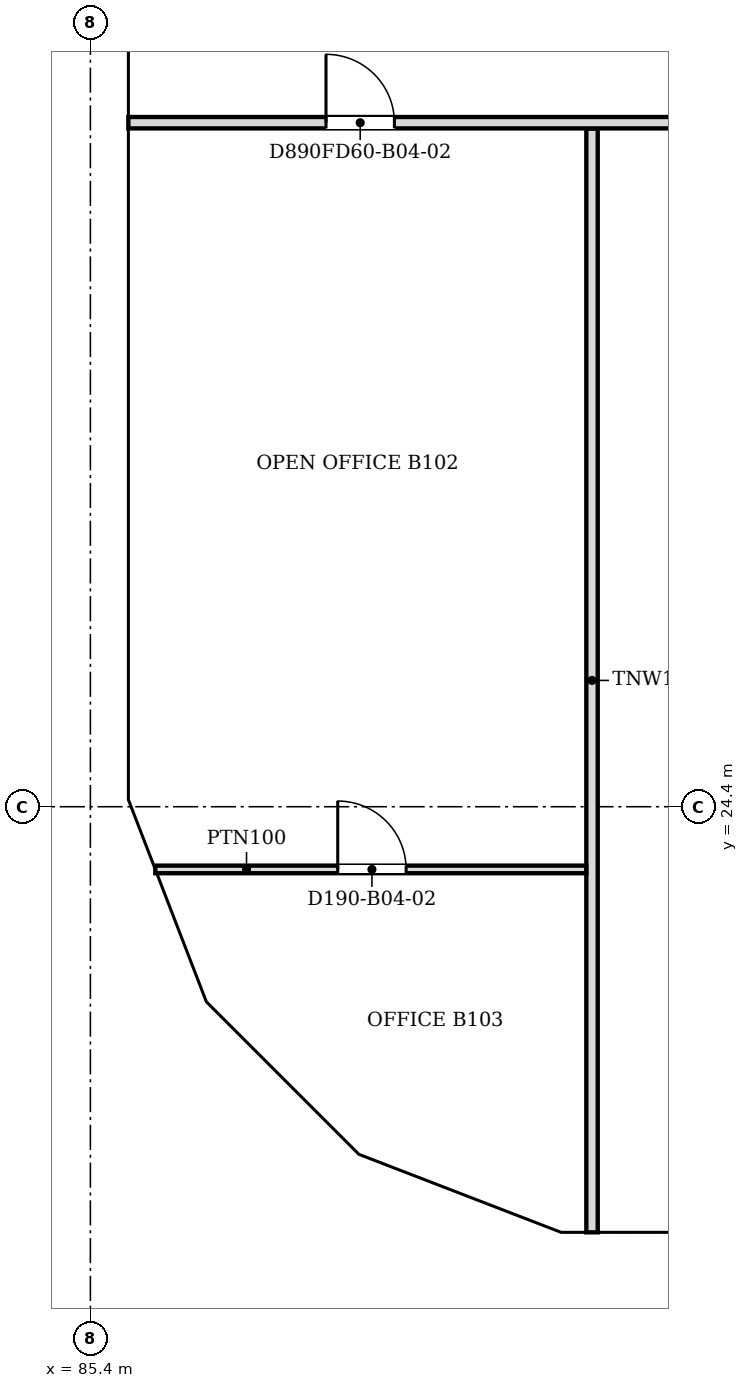
"""IFC4 building model, lengths in metres.
Left out: names, types, materials, properties, quantities, classifications, styles, units other than length and angle.
Written with IfcOpenShell. Run it as: python <this file> out.ifc"""

import sys

from ifc_helpers import new_model, si_unit, direction, frame, frame_2d, origin, place, context, subcontext, project, spatial, polyline, rectangle, outline, extrude, faceted_brep, source, transform, mapped, element, fill, save


model = new_model("IFC4")
c1 = context("Model", 3, precision=1e-05, world=origin(), true_north=direction((0.0, 1.0)))
c2 = subcontext(c1, "Body", "Model", "MODEL_VIEW")
j1 = project(units=[si_unit("LENGTHUNIT", "METRE"), si_unit("PLANEANGLEUNIT", "RADIAN")], contexts=[c1])
p1 = place(None, origin())
s1 = spatial("IfcSite", under=j1, at=p1, CompositionType="ELEMENT")
p2 = place(p1, origin())
s2 = spatial("IfcBuilding", under=s1, at=p2, CompositionType="ELEMENT")
p3 = place(p2, frame((0.0, 0.0, 37.2)))
s3 = spatial("IfcBuildingStorey", under=s2, at=p3, CompositionType="ELEMENT", Elevation=37.2)
m1 = source(origin(), c2, "Body", "Brep", [
    faceted_brep([(3.003, -0.25, 0.0), (6.053, -0.25, 3.8), (3.003, -0.25, 7.6), (0.0, -0.25, 3.8), (0.047, 0.25, 3.859), (3.003, 0.25, 7.6), (6.053, 0.25, 3.8), (3.003, 0.25, 0.0), (0.047, 0.25, 3.741), (0.0, 0.0, 3.8)], [[[0, 1, 2, 3]], [[4, 5, 6, 7, 8]], [[7, 6, 1, 0]], [[6, 5, 2, 1]], [[5, 4, 9, 3, 2]], [[8, 7, 0, 3, 9]], [[8, 9, 4]]]),
])
p4 = place(p3, frame((91.547, 18.55, -3.8), z_axis=(0.0, 0.0, 1.0), x_axis=(1.0, 0.0, 0.0)))
e1 = element("IfcWall", 1, at=p4, inside=s3, PredefinedType="SOLIDWALL", context=c2, shape_type="MappedRepresentation", body=[
    mapped(m1, transform((0.0, 0.0, 0.0), scale=1.0)),
])
m2 = source(origin(), c2, "Body", "SweptSolid", [
    extrude(outline(polyline([(3.005, 0.401), (5.733, 3.8), (3.005, 7.199), (0.319, 3.8), (3.005, 0.401)])), frame((0.0, 0.26, 0.0), z_axis=(0.0, -1.0, 0.0), x_axis=(1.0, 0.0, 0.0)), (0.0, 0.0, 1.0), 0.52),
])
p5 = place(p4, origin())
e2 = element("IfcOpeningElement", 2, at=p5, cuts=e1, PredefinedType="OPENING", context=c2, shape_type="MappedRepresentation", body=[
    mapped(m2, transform((0.0, 0.0, 0.0), scale=1.0)),
])
m3 = source(origin(), c2, "Body", "Brep", [
    faceted_brep([(3.05, -0.25, 0.0), (6.1, -0.25, 3.8), (6.1, -0.25, 3.8), (3.05, -0.25, 7.6), (0.0, -0.25, 3.8), (0.0, 0.25, 3.8), (3.05, 0.25, 7.6), (6.1, 0.25, 3.8), (6.1, 0.25, 3.8), (3.05, 0.25, 0.0)], [[[0, 1, 2, 3, 4]], [[5, 6, 7, 8, 9]], [[9, 8, 1, 0]], [[7, 6, 3, 2]], [[6, 5, 4, 3]], [[5, 9, 0, 4]], [[1, 8, 7, 2]]]),
])
p6 = place(p3, frame((85.65, 39.65, -3.8), z_axis=(0.0, 0.0, 1.0), x_axis=(0.0, -1.0, 0.0)))
e3 = element("IfcWall", 3, at=p6, inside=s3, PredefinedType="SOLIDWALL", context=c2, shape_type="MappedRepresentation", body=[
    mapped(m3, transform((0.0, 0.0, 0.0), scale=1.0)),
])
m4 = source(origin(), c2, "Body", "SweptSolid", [
    extrude(outline(polyline([(3.05, 0.399), (5.78, 3.8), (3.05, 7.201), (0.321, 3.8), (3.05, 0.399)])), frame((0.0, 0.26, 0.0), z_axis=(0.0, -1.0, 0.0), x_axis=(1.0, 0.0, 0.0)), (0.0, 0.0, 1.0), 0.52),
])
p7 = place(p6, origin())
e4 = element("IfcOpeningElement", 4, at=p7, cuts=e3, PredefinedType="OPENING", context=c2, shape_type="MappedRepresentation", body=[
    mapped(m4, transform((0.0, 0.0, 0.0), scale=1.0)),
])
m5 = source(origin(), c2, "Body", "SweptSolid", [
    extrude(outline(polyline([(3.05, 0.0), (6.1, 3.8), (3.05, 7.6), (0.0, 3.8), (3.05, 0.0)])), frame((0.0, 0.25, 0.0), z_axis=(0.0, -1.0, 0.0), x_axis=(1.0, 0.0, 0.0)), (0.0, 0.0, 1.0), 0.5),
])
p8 = place(p3, frame((85.65, 33.55, -3.8), z_axis=(0.0, 0.0, 1.0), x_axis=(0.0, -1.0, 0.0)))
e5 = element("IfcWall", 5, at=p8, inside=s3, PredefinedType="SOLIDWALL", context=c2, shape_type="MappedRepresentation", body=[
    mapped(m5, transform((0.0, 0.0, 0.0), scale=1.0)),
])
p9 = place(p8, origin())
e6 = element("IfcOpeningElement", 6, at=p9, cuts=e5, PredefinedType="OPENING", context=c2, shape_type="MappedRepresentation", body=[
    mapped(m4, transform((0.0, 0.0, 0.0), scale=1.0)),
])
m6 = source(origin(), c2, "Body", "Brep", [
    faceted_brep([(3.003, -0.25, 0.0), (3.05, -0.25, 0.06), (3.05, -0.25, 7.54), (3.003, -0.25, 7.6), (0.0, -0.25, 3.8), (0.0, 0.25, 3.8), (2.957, 0.25, 7.541), (2.957, 0.25, 0.059), (3.003, 0.0, 0.0), (3.003, 0.0, 7.6)], [[[0, 1, 2, 3, 4]], [[5, 6, 7]], [[1, 0, 8]], [[9, 3, 2]], [[6, 5, 4, 3, 9]], [[5, 7, 8, 0, 4]], [[1, 8, 7, 6, 9, 2]]]),
])
p10 = place(p3, frame((85.65, 27.45, -3.8), z_axis=(0.0, 0.0, 1.0), x_axis=(0.0, -1.0, 0.0)))
e7 = element("IfcWall", 7, at=p10, inside=s3, PredefinedType="SOLIDWALL", context=c2, shape_type="MappedRepresentation", body=[
    mapped(m6, transform((0.0, 0.0, 0.0), scale=1.0)),
])
m7 = source(origin(), c2, "Body", "SweptSolid", [
    extrude(outline(polyline([(2.803, 6.944), (0.319, 3.8), (2.803, 0.656), (2.803, 6.944)])), frame((0.0, 0.26, 0.0), z_axis=(0.0, -1.0, 0.0), x_axis=(1.0, 0.0, 0.0)), (0.0, 0.0, 1.0), 0.52),
])
p11 = place(p10, origin())
e8 = element("IfcOpeningElement", 8, at=p11, cuts=e7, PredefinedType="OPENING", context=c2, shape_type="MappedRepresentation", body=[
    mapped(m7, transform((0.0, 0.0, 0.0), scale=1.0)),
])
m8 = source(origin(), c2, "Body", "Brep", [
    faceted_brep([(0.047, -0.25, 0.0), (2.997, -0.25, 3.8), (0.047, -0.25, 7.6), (0.0, -0.25, 7.541), (0.0, -0.25, 0.059), (0.093, 0.25, 7.54), (2.944, 0.25, 3.868), (2.944, 0.25, 3.732), (0.093, 0.25, 0.06), (2.997, 0.0, 3.8), (0.047, 0.0, 0.0), (0.047, 0.0, 7.6)], [[[0, 1, 2, 3, 4]], [[5, 6, 7, 8]], [[8, 7, 9, 1, 0, 10]], [[6, 5, 11, 2, 1, 9]], [[3, 2, 11]], [[10, 0, 4]], [[8, 10, 4, 3, 11, 5]], [[9, 7, 6]]]),
])
p12 = place(p3, frame((85.633, 24.49, -3.8), z_axis=(0.0, 0.0, 1.0), x_axis=(0.359901446078, -0.932990326376, 0.0)))
e9 = element("IfcWall", 9, at=p12, inside=s3, PredefinedType="SOLIDWALL", context=c2, shape_type="MappedRepresentation", body=[
    mapped(m8, transform((0.0, 0.0, 0.0), scale=1.0)),
])
m9 = source(origin(), c2, "Body", "SweptSolid", [
    extrude(outline(polyline([(0.247, 0.665), (2.681, 3.8), (0.247, 6.935), (0.247, 0.665)])), frame((0.0, 0.26, 0.0), z_axis=(0.0, -1.0, 0.0), x_axis=(1.0, 0.0, 0.0)), (0.0, 0.0, 1.0), 0.52),
])
p13 = place(p12, origin())
e10 = element("IfcOpeningElement", 10, at=p13, cuts=e9, PredefinedType="OPENING", context=c2, shape_type="MappedRepresentation", body=[
    mapped(m9, transform((0.0, 0.0, 0.0), scale=1.0)),
])
m10 = source(origin(), c2, "Body", "Brep", [
    faceted_brep([(2.944, -0.25, 0.0), (2.997, -0.25, 0.068), (2.997, -0.25, 7.532), (2.944, -0.25, 7.6), (0.0, -0.25, 3.8), (0.053, 0.25, 3.868), (2.891, 0.25, 7.532), (2.891, 0.25, 0.068), (0.053, 0.25, 3.732), (2.944, 0.0, 0.0), (2.944, 0.0, 7.6), (0.0, 0.0, 3.8)], [[[0, 1, 2, 3, 4]], [[5, 6, 7, 8]], [[1, 0, 9]], [[10, 3, 2]], [[6, 5, 11, 4, 3, 10]], [[8, 7, 9, 0, 4, 11]], [[8, 11, 5]], [[1, 9, 7, 6, 10, 2]]]),
])
p14 = place(p3, frame((86.712, 21.694, -3.8), z_axis=(0.0, 0.0, 1.0), x_axis=(0.707066050402, -0.707147509625, 0.0)))
e11 = element("IfcWall", 11, at=p14, inside=s3, PredefinedType="SOLIDWALL", context=c2, shape_type="MappedRepresentation", body=[
    mapped(m10, transform((0.0, 0.0, 0.0), scale=1.0)),
])
m11 = source(origin(), c2, "Body", "SweptSolid", [
    extrude(outline(polyline([(2.744, 6.934), (0.316, 3.8), (2.744, 0.667), (2.744, 6.934)])), frame((0.0, 0.26, 0.0), z_axis=(0.0, -1.0, 0.0), x_axis=(1.0, 0.0, 0.0)), (0.0, 0.0, 1.0), 0.52),
])
p15 = place(p14, origin())
e12 = element("IfcOpeningElement", 12, at=p15, cuts=e11, PredefinedType="OPENING", context=c2, shape_type="MappedRepresentation", body=[
    mapped(m11, transform((0.0, 0.0, 0.0), scale=1.0)),
])
m12 = source(origin(), c2, "Body", "Brep", [
    faceted_brep([(0.053, -0.25, 0.0), (3.003, -0.25, 3.8), (0.053, -0.25, 7.6), (0.0, -0.25, 7.532), (0.0, -0.25, 0.068), (0.106, 0.25, 7.532), (2.957, 0.25, 3.86), (2.957, 0.25, 3.74), (0.106, 0.25, 0.068), (3.003, 0.0, 3.8), (0.053, 0.0, 0.0), (0.053, 0.0, 7.6)], [[[0, 1, 2, 3, 4]], [[5, 6, 7, 8]], [[8, 7, 9, 1, 0, 10]], [[6, 5, 11, 2, 1, 9]], [[3, 2, 11]], [[10, 0, 4]], [[8, 10, 4, 3, 11, 5]], [[9, 7, 6]]]),
])
p16 = place(p3, frame((88.744, 19.631, -3.8), z_axis=(0.0, 0.0, 1.0), x_axis=(0.932997369089, -0.359883188373, 0.0)))
e13 = element("IfcWall", 13, at=p16, inside=s3, PredefinedType="SOLIDWALL", context=c2, shape_type="MappedRepresentation", body=[
    mapped(m12, transform((0.0, 0.0, 0.0), scale=1.0)),
])
m13 = source(origin(), c2, "Body", "SweptSolid", [
    extrude(outline(polyline([(0.253, 0.665), (2.687, 3.8), (0.253, 6.935), (0.253, 0.665)])), frame((0.0, 0.26, 0.0), z_axis=(0.0, -1.0, 0.0), x_axis=(1.0, 0.0, 0.0)), (0.0, 0.0, 1.0), 0.52),
])
p17 = place(p16, origin())
e14 = element("IfcOpeningElement", 14, at=p17, cuts=e13, PredefinedType="OPENING", context=c2, shape_type="MappedRepresentation", body=[
    mapped(m13, transform((0.0, 0.0, 0.0), scale=1.0)),
])
p18 = place(p2, frame((0.0, 0.0, 41.0)))
s4 = spatial("IfcBuildingStorey", under=s2, at=p18, CompositionType="ELEMENT", Elevation=41.0)
m14 = source(origin(), c2, "Body", "Brep", [
    faceted_brep([(0.047, -0.25, 0.0), (3.05, -0.25, 3.8), (0.047, -0.25, 7.6), (0.0, -0.25, 7.54), (0.0, -0.25, 0.06), (0.093, 0.25, 7.541), (3.05, 0.25, 3.8), (0.093, 0.25, 0.059), (0.047, 0.0, 0.0), (0.047, 0.0, 7.6)], [[[0, 1, 2, 3, 4]], [[5, 6, 7]], [[7, 6, 1, 0, 8]], [[6, 5, 9, 2, 1]], [[3, 2, 9]], [[8, 0, 4]], [[7, 8, 4, 3, 9, 5]]]),
])
p19 = place(p18, frame((91.5, 18.55, -3.8), z_axis=(0.0, 0.0, 1.0), x_axis=(1.0, 0.0, 0.0)))
e15 = element("IfcWall", 15, at=p19, inside=s4, PredefinedType="SOLIDWALL", context=c2, shape_type="MappedRepresentation", body=[
    mapped(m14, transform((0.0, 0.0, 0.0), scale=1.0)),
])
m15 = source(origin(), c2, "Body", "SweptSolid", [
    extrude(outline(polyline([(0.247, 0.656), (2.731, 3.8), (0.247, 6.944), (0.247, 0.656)])), frame((0.0, 0.26, 0.0), z_axis=(0.0, -1.0, 0.0), x_axis=(1.0, 0.0, 0.0)), (0.0, 0.0, 1.0), 0.52),
])
p20 = place(p19, origin())
e16 = element("IfcOpeningElement", 16, at=p20, cuts=e15, PredefinedType="OPENING", context=c2, shape_type="MappedRepresentation", body=[
    mapped(m15, transform((0.0, 0.0, 0.0), scale=1.0)),
])
m16 = source(origin(), c2, "Body", "Brep", [
    faceted_brep([(2.95, -0.25, 0.0), (2.997, -0.25, 0.059), (2.997, -0.25, 7.541), (2.95, -0.25, 7.6), (0.0, -0.25, 3.8), (0.053, 0.25, 3.868), (2.904, 0.25, 7.54), (2.904, 0.25, 0.06), (0.053, 0.25, 3.732), (2.95, 0.0, 0.0), (2.95, 0.0, 7.6), (0.0, 0.0, 3.8)], [[[0, 1, 2, 3, 4]], [[5, 6, 7, 8]], [[1, 0, 9]], [[10, 3, 2]], [[6, 5, 11, 4, 3, 10]], [[8, 7, 9, 0, 4, 11]], [[8, 11, 5]], [[1, 9, 7, 6, 10, 2]]]),
])
p21 = place(p18, frame((88.794, 19.612, -3.8), z_axis=(0.0, 0.0, 1.0), x_axis=(0.933000876937, -0.359874094142, 0.0)))
e17 = element("IfcWall", 17, at=p21, inside=s4, PredefinedType="SOLIDWALL", context=c2, shape_type="MappedRepresentation", body=[
    mapped(m16, transform((0.0, 0.0, 0.0), scale=1.0)),
])
m17 = source(origin(), c2, "Body", "SweptSolid", [
    extrude(outline(polyline([(2.75, 6.935), (0.316, 3.8), (2.75, 0.665), (2.75, 6.935)])), frame((0.0, 0.26, 0.0), z_axis=(0.0, -1.0, 0.0), x_axis=(1.0, 0.0, 0.0)), (0.0, 0.0, 1.0), 0.52),
])
p22 = place(p21, origin())
e18 = element("IfcOpeningElement", 18, at=p22, cuts=e17, PredefinedType="OPENING", context=c2, shape_type="MappedRepresentation", body=[
    mapped(m17, transform((0.0, 0.0, 0.0), scale=1.0)),
])
p23 = place(p18, frame((85.65, 36.6, -3.8), z_axis=(0.0, 0.0, 1.0), x_axis=(0.0, -1.0, 0.0)))
e19 = element("IfcWall", 19, at=p23, inside=s4, PredefinedType="SOLIDWALL", context=c2, shape_type="MappedRepresentation", body=[
    mapped(m5, transform((0.0, 0.0, 0.0), scale=1.0)),
])
p24 = place(p23, origin())
e20 = element("IfcOpeningElement", 20, at=p24, cuts=e19, PredefinedType="OPENING", context=c2, shape_type="MappedRepresentation", body=[
    mapped(m4, transform((0.0, 0.0, 0.0), scale=1.0)),
])
m18 = source(origin(), c2, "Body", "Brep", [
    faceted_brep([(3.05, -0.25, 0.0), (6.053, -0.25, 3.8), (3.05, -0.25, 7.6), (0.0, -0.25, 3.8), (0.0, 0.25, 3.8), (3.05, 0.25, 7.6), (6.007, 0.25, 3.859), (6.007, 0.25, 3.741), (3.05, 0.25, 0.0), (6.053, 0.0, 3.8)], [[[0, 1, 2, 3]], [[4, 5, 6, 7, 8]], [[8, 7, 9, 1, 0]], [[6, 5, 2, 1, 9]], [[5, 4, 3, 2]], [[4, 8, 0, 3]], [[9, 7, 6]]]),
])
p25 = place(p18, frame((85.65, 30.5, -3.8), z_axis=(0.0, 0.0, 1.0), x_axis=(0.0, -1.0, 0.0)))
e21 = element("IfcWall", 21, at=p25, inside=s4, PredefinedType="SOLIDWALL", context=c2, shape_type="MappedRepresentation", body=[
    mapped(m18, transform((0.0, 0.0, 0.0), scale=1.0)),
])
m19 = source(origin(), c2, "Body", "SweptSolid", [
    extrude(outline(polyline([(3.049, 0.401), (5.735, 3.8), (3.049, 7.199), (0.321, 3.8), (3.049, 0.401)])), frame((0.0, 0.26, 0.0), z_axis=(0.0, -1.0, 0.0), x_axis=(1.0, 0.0, 0.0)), (0.0, 0.0, 1.0), 0.52),
])
p26 = place(p25, origin())
e22 = element("IfcOpeningElement", 22, at=p26, cuts=e21, PredefinedType="OPENING", context=c2, shape_type="MappedRepresentation", body=[
    mapped(m19, transform((0.0, 0.0, 0.0), scale=1.0)),
])
m20 = source(origin(), c2, "Body", "Brep", [
    faceted_brep([(2.95, -0.25, 0.0), (3.003, -0.25, 0.068), (3.003, -0.25, 7.532), (2.95, -0.25, 7.6), (0.0, -0.25, 3.8), (0.047, 0.25, 3.86), (2.898, 0.25, 7.532), (2.898, 0.25, 0.068), (0.047, 0.25, 3.74), (2.95, 0.0, 0.0), (2.95, 0.0, 7.6), (0.0, 0.0, 3.8)], [[[0, 1, 2, 3, 4]], [[5, 6, 7, 8]], [[1, 0, 9]], [[10, 3, 2]], [[6, 5, 11, 4, 3, 10]], [[8, 7, 9, 0, 4, 11]], [[8, 11, 5]], [[1, 9, 7, 6, 10, 2]]]),
])
p27 = place(p18, frame((85.65, 24.447, -3.8), z_axis=(0.0, 0.0, 1.0), x_axis=(0.35992665181, -0.932980602862, 0.0)))
e23 = element("IfcWall", 23, at=p27, inside=s4, PredefinedType="SOLIDWALL", context=c2, shape_type="MappedRepresentation", body=[
    mapped(m20, transform((0.0, 0.0, 0.0), scale=1.0)),
])
p28 = place(p27, origin())
e24 = element("IfcOpeningElement", 24, at=p28, cuts=e23, PredefinedType="OPENING", context=c2, shape_type="MappedRepresentation", body=[
    mapped(m17, transform((0.0, 0.0, 0.0), scale=1.0)),
])
m21 = source(origin(), c2, "Body", "Brep", [
    faceted_brep([(0.053, -0.25, 0.0), (2.997, -0.25, 3.8), (0.053, -0.25, 7.6), (0.0, -0.25, 7.532), (0.0, -0.25, 0.068), (0.106, 0.25, 7.532), (2.944, 0.25, 3.868), (2.944, 0.25, 3.732), (0.106, 0.25, 0.068), (2.997, 0.0, 3.8), (0.053, 0.0, 0.0), (0.053, 0.0, 7.6)], [[[0, 1, 2, 3, 4]], [[5, 6, 7, 8]], [[8, 7, 9, 1, 0, 10]], [[6, 5, 11, 2, 1, 9]], [[3, 2, 11]], [[10, 0, 4]], [[8, 10, 4, 3, 11, 5]], [[9, 7, 6]]]),
])
p29 = place(p18, frame((86.675, 21.731, -3.8), z_axis=(0.0, 0.0, 1.0), x_axis=(0.707106781187, -0.707106781187, 0.0)))
e25 = element("IfcWall", 25, at=p29, inside=s4, PredefinedType="SOLIDWALL", context=c2, shape_type="MappedRepresentation", body=[
    mapped(m21, transform((0.0, 0.0, 0.0), scale=1.0)),
])
m22 = source(origin(), c2, "Body", "SweptSolid", [
    extrude(outline(polyline([(0.253, 0.666), (2.681, 3.8), (0.253, 6.934), (0.253, 0.666)])), frame((0.0, 0.26, 0.0), z_axis=(0.0, -1.0, 0.0), x_axis=(1.0, 0.0, 0.0)), (0.0, 0.0, 1.0), 0.52),
])
p30 = place(p29, origin())
e26 = element("IfcOpeningElement", 26, at=p30, cuts=e25, PredefinedType="OPENING", context=c2, shape_type="MappedRepresentation", body=[
    mapped(m22, transform((0.0, 0.0, 0.0), scale=1.0)),
])
p31 = place(p3, frame((92.0, 18.8, 0.0), z_axis=(0.0, 0.0, 1.0), x_axis=(0.0, 1.0, 0.0)))
e27 = element("IfcWall", 27, at=p31, inside=s3, PredefinedType="PARTITIONING", context=c2, shape_type="SweptSolid", body=[
    extrude(rectangle(XDim=14.524, YDim=0.15, at=frame_2d((7.262, 0.0))), origin(), (0.0, 0.0, 1.0), 3.067),
])
p32 = place(p3, frame((91.924, 23.575, 0.0), z_axis=(0.0, 0.0, 1.0), x_axis=(-1.0, 0.0, 0.0)))
e28 = element("IfcWall", 28, at=p32, inside=s3, PredefinedType="PARTITIONING", context=c2, shape_type="SweptSolid", body=[
    extrude(rectangle(XDim=5.67, YDim=0.1, at=frame_2d((2.835, 0.0))), origin(), (0.0, 0.0, 1.0), 3.067),
])
m23 = source(origin(), c2, "Body", "SweptSolid", [
    extrude(rectangle(XDim=0.9, YDim=2.1, at=frame_2d((0.45, 1.05))), frame((0.0, 0.06, 0.0), z_axis=(0.0, -1.0, 0.0), x_axis=(1.0, 0.0, 0.0)), (0.0, 0.0, 1.0), 0.12),
])
p33 = place(p32, frame((2.37, 0.0, 0.0)))
e29 = element("IfcOpeningElement", 29, at=p33, cuts=e28, PredefinedType="OPENING", context=c2, shape_type="MappedRepresentation", body=[
    mapped(m23, transform((0.0, 0.0, 0.0), scale=1.0)),
])
p34 = place(p3, frame((133.7, 33.4, 0.0), z_axis=(0.0, 0.0, 1.0), x_axis=(-1.0, 0.0, 0.0)))
e30 = element("IfcWall", 30, at=p34, inside=s3, PredefinedType="PARTITIONING", context=c2, shape_type="SweptSolid", body=[
    extrude(rectangle(XDim=47.8, YDim=0.15, at=frame_2d((23.9, 0.0))), origin(), (0.0, 0.0, 1.0), 3.067),
])
m24 = source(origin(), c2, "Body", "SweptSolid", [
    extrude(rectangle(XDim=0.9, YDim=2.1, at=frame_2d((0.45, 1.05))), frame((0.0, 0.085, 0.0), z_axis=(0.0, -1.0, 0.0), x_axis=(1.0, 0.0, 0.0)), (0.0, 0.0, 1.0), 0.17),
])
p35 = place(p34, frame((14.099, 0.0, 0.0)))
e31 = element("IfcOpeningElement", 31, at=p35, cuts=e30, PredefinedType="OPENING", context=c2, shape_type="MappedRepresentation", body=[
    mapped(m24, transform((0.0, 0.0, 0.0), scale=1.0)),
])
p36 = place(p34, frame((44.3, 0.0, 0.0)))
e32 = element("IfcOpeningElement", 32, at=p36, cuts=e30, PredefinedType="OPENING", context=c2, shape_type="MappedRepresentation", body=[
    mapped(m24, transform((0.0, 0.0, 0.0), scale=1.0)),
])
p37 = place(p34, frame((5.4, 0.0, 0.0)))
e33 = element("IfcOpeningElement", 33, at=p37, cuts=e30, PredefinedType="OPENING", context=c2, shape_type="MappedRepresentation", body=[
    mapped(m24, transform((0.0, 0.0, 0.0), scale=1.0)),
])
m25 = source(origin(), c2, "Body", "SweptSolid", [
    extrude(rectangle(XDim=1.0, YDim=2.1, at=frame_2d((0.5, 1.05))), frame((0.0, 0.085, 0.0), z_axis=(0.0, -1.0, 0.0), x_axis=(1.0, 0.0, 0.0)), (0.0, 0.0, 1.0), 0.17),
])
p38 = place(p34, frame((22.899, 0.0, 0.0)))
e34 = element("IfcOpeningElement", 34, at=p38, cuts=e30, PredefinedType="OPENING", context=c2, shape_type="MappedRepresentation", body=[
    mapped(m25, transform((0.0, 0.0, 0.0), scale=1.0)),
])
p39 = place(p34, frame((35.1, 0.0, 0.0)))
e35 = element("IfcOpeningElement", 35, at=p39, cuts=e30, PredefinedType="OPENING", context=c2, shape_type="MappedRepresentation", body=[
    mapped(m25, transform((0.0, 0.0, 0.0), scale=1.0)),
])
m26 = source(origin(), c2, "Body", "SweptSolid", [
    extrude(rectangle(XDim=0.9, YDim=2.1, at=frame_2d((0.45, 1.05))), frame((0.0, 0.025, 0.0), z_axis=(0.0, -1.0, 0.0), x_axis=(1.0, 0.0, 0.0)), (0.0, 0.0, 1.0), 0.05),
])
p40 = place(p33, origin())
e36 = element("IfcDoor", 36, at=p40, inside=s3, OperationType="SINGLE_SWING_RIGHT", PredefinedType="DOOR", context=c2, shape_type="MappedRepresentation", body=[
    mapped(m26, transform((0.0, 0.0, 0.0), scale=1.0)),
])
fill(e29, e36)
p41 = place(p36, origin())
e37 = element("IfcDoor", 37, at=p41, inside=s3, OperationType="SINGLE_SWING_RIGHT", PredefinedType="DOOR", context=c2, shape_type="MappedRepresentation", body=[
    mapped(m26, transform((0.0, 0.0, 0.0), scale=1.0)),
])
fill(e32, e37)
save(model, sys.argv[1])
